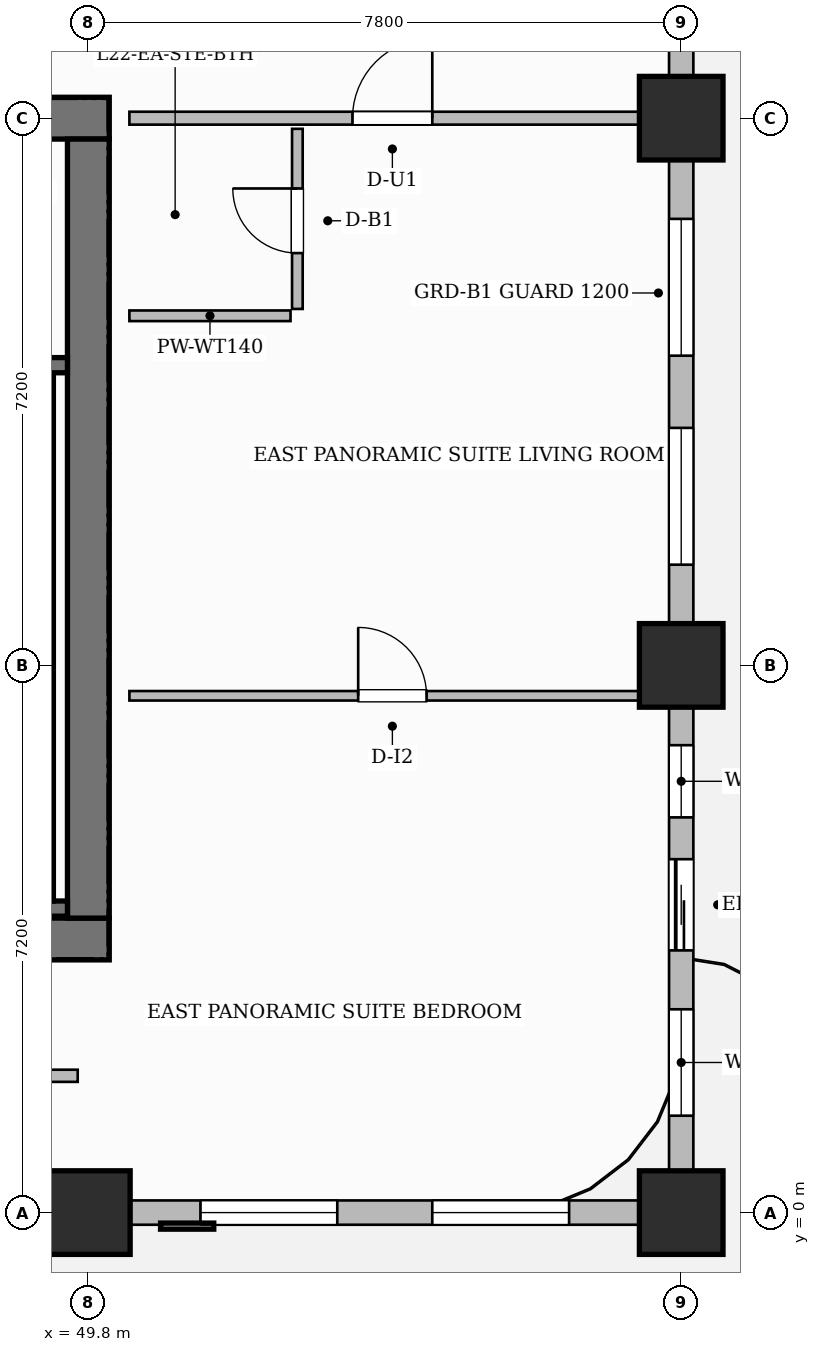
"""IFC4 building model, lengths in metres.
Left out: names, types, materials, properties, quantities, classifications, styles, units other than length and angle.
Written with IfcOpenShell. Run it as: python <this file> out.ifc"""

import sys

from ifc_helpers import new_model, si_unit, direction, frame, frame_2d, origin, origin_2d, place, context, subcontext, project, spatial, rectangle, extrude, source, transform, mapped, element, fill, save


model = new_model("IFC4")
c1 = context("Model", 3, precision=1e-05, world=origin(), true_north=direction((0.0, 1.0)))
c2 = subcontext(c1, "Body", "Model", "MODEL_VIEW")
j1 = project(units=[si_unit("LENGTHUNIT", "METRE"), si_unit("PLANEANGLEUNIT", "RADIAN")], contexts=[c1])
p1 = place(None, origin())
s1 = spatial("IfcSite", under=j1, at=p1, CompositionType="ELEMENT")
p2 = place(p1, origin())
s2 = spatial("IfcBuilding", under=s1, at=p2, CompositionType="ELEMENT")
p3 = place(p2, frame((0.0, 0.0, 91.6)))
s3 = spatial("IfcBuildingStorey", under=s2, at=p3, CompositionType="ELEMENT", Elevation=91.6)
p4 = place(p3, frame((34.525, 3.6, 0.0), z_axis=(0.0, 0.0, 1.0), x_axis=(1.0, 0.0, 0.0)))
e1 = element("IfcWall", 1, at=p4, inside=s3, PredefinedType="SHEAR", context=c2, shape_type="SweptSolid", body=[
    extrude(rectangle(XDim=15.55, YDim=0.55, at=frame_2d((7.775, 0.0))), origin(), (0.0, 0.0, 1.0), 3.7),
])
p5 = place(p4, frame((4.475, 0.0, 0.0)))
e2 = element("IfcOpeningElement", 2, at=p5, cuts=e1, PredefinedType="OPENING", context=c2, shape_type="SweptSolid", body=[
    extrude(rectangle(XDim=0.9, YDim=2.1, at=frame_2d((0.45, 1.05))), frame((0.0, 0.285, 0.0), z_axis=(0.0, -1.0, 0.0), x_axis=(1.0, 0.0, 0.0)), (0.0, 0.0, 1.0), 0.57),
])
p6 = place(p4, frame((6.925, 0.0, 0.0)))
e3 = element("IfcOpeningElement", 3, at=p6, cuts=e1, PredefinedType="OPENING", context=c2, shape_type="SweptSolid", body=[
    extrude(rectangle(XDim=0.9, YDim=2.1, at=frame_2d((0.45, 1.05))), frame((0.0, 0.285, 0.0), z_axis=(0.0, -1.0, 0.0), x_axis=(1.0, 0.0, 0.0)), (0.0, 0.0, 1.0), 0.57),
])
p7 = place(p3, frame((34.525, 14.4, 0.0), z_axis=(0.0, 0.0, 1.0), x_axis=(1.0, 0.0, 0.0)))
e4 = element("IfcWall", 4, at=p7, inside=s3, PredefinedType="SHEAR", context=c2, shape_type="SweptSolid", body=[
    extrude(rectangle(XDim=15.55, YDim=0.55, at=frame_2d((7.775, 0.0))), origin(), (0.0, 0.0, 1.0), 3.7),
])
p8 = place(p7, frame((5.405, 0.0, 0.0)))
e5 = element("IfcOpeningElement", 5, at=p8, cuts=e4, PredefinedType="OPENING", context=c2, shape_type="SweptSolid", body=[
    extrude(rectangle(XDim=1.5, YDim=2.2, at=frame_2d((0.75, 1.1))), frame((0.0, 0.285, 0.0), z_axis=(0.0, -1.0, 0.0), x_axis=(1.0, 0.0, 0.0)), (0.0, 0.0, 1.0), 0.57),
])
p9 = place(p7, frame((1.62, 0.0, 0.0)))
e6 = element("IfcOpeningElement", 6, at=p9, cuts=e4, PredefinedType="OPENING", context=c2, shape_type="SweptSolid", body=[
    extrude(rectangle(XDim=1.05, YDim=2.15, at=frame_2d((0.525, 1.075))), frame((0.0, 0.285, 0.0), z_axis=(0.0, -1.0, 0.0), x_axis=(1.0, 0.0, 0.0)), (0.0, 0.0, 1.0), 0.57),
])
p10 = place(p7, frame((11.25, 0.0, 0.0)))
e7 = element("IfcOpeningElement", 7, at=p10, cuts=e4, PredefinedType="OPENING", context=c2, shape_type="SweptSolid", body=[
    extrude(rectangle(XDim=1.05, YDim=2.15, at=frame_2d((0.525, 1.075))), frame((0.0, 0.285, 0.0), z_axis=(0.0, -1.0, 0.0), x_axis=(1.0, 0.0, 0.0)), (0.0, 0.0, 1.0), 0.57),
])
p11 = place(p3, frame((49.8, 3.875, 0.0), z_axis=(0.0, 0.0, 1.0), x_axis=(0.0, 1.0, 0.0)))
e8 = element("IfcWall", 8, at=p11, inside=s3, PredefinedType="SHEAR", context=c2, shape_type="SweptSolid", body=[
    extrude(rectangle(XDim=10.25, YDim=0.55, at=frame_2d((5.125, 0.0))), origin(), (0.0, 0.0, 1.0), 3.7),
])
m1 = source(origin(), c2, "Body", "SweptSolid", [
    extrude(rectangle(XDim=1.1, YDim=1.1, at=origin_2d()), origin(), (0.0, 0.0, 1.0), 3.7),
])
for number, where, z_axis, x_axis in (
    (9, (49.8, 0.0, 0.0), (0.0, 0.0, 1.0), (1.0, 0.0, 0.0)),
    (10, (57.6, 0.0, 0.0), (0.0, 0.0, 1.0), (1.0, 0.0, 0.0)),
    (11, (57.6, 7.2, 0.0), (0.0, 0.0, 1.0), (1.0, 0.0, 0.0)),
    (12, (57.6, 14.4, 0.0), (0.0, 0.0, 1.0), (1.0, 0.0, 0.0)),
):
    element("IfcColumn", number, at=place(p3, frame(where, z_axis=z_axis, x_axis=x_axis)), inside=s3, PredefinedType="COLUMN", context=c2, shape_type="MappedRepresentation", body=[
        mapped(m1, transform((0.0, 0.0, 0.0), scale=1.0)),
    ])
p12 = place(p3, frame((43.12, 4.0, 0.0), z_axis=(0.0, 0.0, 1.0), x_axis=(1.0, 0.0, 0.0)))
e13 = element("IfcWall", 13, at=p12, inside=s3, PredefinedType="SHEAR", context=c2, shape_type="SweptSolid", body=[
    extrude(rectangle(XDim=6.405, YDim=0.2, at=frame_2d((3.202, 0.0))), origin(), (0.0, 0.0, 1.0), 3.7),
])
p13 = place(p3, frame((49.24, 4.1, 0.0), z_axis=(0.0, 0.0, 1.0), x_axis=(0.0, 1.0, 0.0)))
e14 = element("IfcWall", 14, at=p13, inside=s3, PredefinedType="SHEAR", context=c2, shape_type="SweptSolid", body=[
    extrude(rectangle(XDim=6.95, YDim=0.2, at=frame_2d((3.475, 0.0))), origin(), (0.0, 0.0, 1.0), 3.7),
])
p14 = place(p3, frame((43.12, 11.15, 0.0), z_axis=(0.0, 0.0, 1.0), x_axis=(1.0, 0.0, 0.0)))
e15 = element("IfcWall", 15, at=p14, inside=s3, PredefinedType="SHEAR", context=c2, shape_type="SweptSolid", body=[
    extrude(rectangle(XDim=6.405, YDim=0.2, at=frame_2d((3.202, 0.0))), origin(), (0.0, 0.0, 1.0), 3.7),
])
p15 = place(p14, frame((1.045, 0.0, 0.0)))
e16 = element("IfcOpeningElement", 16, at=p15, cuts=e15, PredefinedType="OPENING", context=c2, shape_type="SweptSolid", body=[
    extrude(rectangle(XDim=1.05, YDim=2.2, at=frame_2d((0.525, 1.1))), frame((0.0, 0.11, 0.0), z_axis=(0.0, -1.0, 0.0), x_axis=(1.0, 0.0, 0.0)), (0.0, 0.0, 1.0), 0.22),
])
p16 = place(p14, frame((4.125, 0.0, 0.0)))
e17 = element("IfcOpeningElement", 17, at=p16, cuts=e15, PredefinedType="OPENING", context=c2, shape_type="SweptSolid", body=[
    extrude(rectangle(XDim=1.05, YDim=2.2, at=frame_2d((0.525, 1.1))), frame((0.0, 0.11, 0.0), z_axis=(0.0, -1.0, 0.0), x_axis=(1.0, 0.0, 0.0)), (0.0, 0.0, 1.0), 0.22),
])
p17 = place(p3, frame((30.29, 1.8, 0.0), z_axis=(0.0, 0.0, 1.0), x_axis=(1.0, 0.0, 0.0)))
e18 = element("IfcWall", 18, at=p17, inside=s3, PredefinedType="PARTITIONING", context=c2, shape_type="SweptSolid", body=[
    extrude(rectangle(XDim=19.37, YDim=0.16, at=frame_2d((9.685, 0.0))), origin(), (0.0, 0.0, 1.0), 3.45),
])
p18 = place(p17, frame((9.735, 0.0, 0.0)))
e19 = element("IfcOpeningElement", 19, at=p18, cuts=e18, PredefinedType="OPENING", context=c2, shape_type="SweptSolid", body=[
    extrude(rectangle(XDim=0.95, YDim=2.15, at=frame_2d((0.475, 1.075))), frame((0.0, 0.09, 0.0), z_axis=(0.0, -1.0, 0.0), x_axis=(1.0, 0.0, 0.0)), (0.0, 0.0, 1.0), 0.18),
])
p19 = place(p3, frame((50.34, 14.4, 0.0), z_axis=(0.0, 0.0, 1.0), x_axis=(1.0, 0.0, 0.0)))
e20 = element("IfcWall", 20, at=p19, inside=s3, PredefinedType="PARTITIONING", context=c2, shape_type="SweptSolid", body=[
    extrude(rectangle(XDim=7.07, YDim=0.17, at=frame_2d((3.535, 0.0))), origin(), (0.0, 0.0, 1.0), 2.885),
])
p20 = place(p19, frame((2.935, 0.0, 0.0)))
e21 = element("IfcOpeningElement", 21, at=p20, cuts=e20, PredefinedType="OPENING", context=c2, shape_type="SweptSolid", body=[
    extrude(rectangle(XDim=1.05, YDim=2.25, at=frame_2d((0.525, 1.125))), frame((0.0, 0.095, 0.0), z_axis=(0.0, -1.0, 0.0), x_axis=(1.0, 0.0, 0.0)), (0.0, 0.0, 1.0), 0.19),
])
p21 = place(p3, frame((52.55, 11.89, 0.0), z_axis=(0.0, 0.0, 1.0), x_axis=(0.0, 1.0, 0.0)))
e22 = element("IfcWall", 22, at=p21, inside=s3, PredefinedType="PARTITIONING", context=c2, shape_type="SweptSolid", body=[
    extrude(rectangle(XDim=2.37, YDim=0.14, at=frame_2d((1.185, 0.0))), origin(), (0.0, 0.0, 1.0), 3.45),
])
p22 = place(p21, frame((0.735, 0.0, 0.0)))
e23 = element("IfcOpeningElement", 23, at=p22, cuts=e22, PredefinedType="OPENING", context=c2, shape_type="SweptSolid", body=[
    extrude(rectangle(XDim=0.85, YDim=2.1, at=frame_2d((0.425, 1.05))), frame((0.0, 0.08, 0.0), z_axis=(0.0, -1.0, 0.0), x_axis=(1.0, 0.0, 0.0)), (0.0, 0.0, 1.0), 0.16),
])
p23 = place(p3, frame((50.34, 11.8, 0.0), z_axis=(0.0, 0.0, 1.0), x_axis=(1.0, 0.0, 0.0)))
e24 = element("IfcWall", 24, at=p23, inside=s3, PredefinedType="PARTITIONING", context=c2, shape_type="SweptSolid", body=[
    extrude(rectangle(XDim=2.12, YDim=0.14, at=frame_2d((1.06, 0.0))), origin(), (0.0, 0.0, 1.0), 3.45),
])
p24 = place(p3, frame((50.34, 6.8, 0.0), z_axis=(0.0, 0.0, 1.0), x_axis=(1.0, 0.0, 0.0)))
e25 = element("IfcWall", 25, at=p24, inside=s3, PredefinedType="PARTITIONING", context=c2, shape_type="SweptSolid", body=[
    extrude(rectangle(XDim=7.07, YDim=0.125, at=frame_2d((3.535, 0.0))), origin(), (0.0, 0.0, 1.0), 3.45),
])
p25 = place(p24, frame((3.01, 0.0, 0.0)))
e26 = element("IfcOpeningElement", 26, at=p25, cuts=e25, PredefinedType="OPENING", context=c2, shape_type="SweptSolid", body=[
    extrude(rectangle(XDim=0.9, YDim=2.15, at=frame_2d((0.45, 1.075))), frame((0.0, 0.073, 0.0), z_axis=(0.0, -1.0, 0.0), x_axis=(1.0, 0.0, 0.0)), (0.0, 0.0, 1.0), 0.145),
])
p26 = place(p3, frame((14.4, 0.0, 0.0), z_axis=(0.0, 0.0, 1.0), x_axis=(1.0, 0.0, 0.0)))
e27 = element("IfcWall", 27, at=p26, inside=s3, PredefinedType="SOLIDWALL", context=c2, shape_type="SweptSolid", body=[
    extrude(rectangle(XDim=43.2, YDim=0.32, at=frame_2d((21.6, 0.0))), origin(), (0.0, 0.0, 1.0), 2.885),
])
p27 = place(p26, frame((0.85, 0.0, 0.0)))
e28 = element("IfcOpeningElement", 28, at=p27, cuts=e27, PredefinedType="OPENING", context=c2, shape_type="SweptSolid", body=[
    extrude(rectangle(XDim=1.2, YDim=2.2, at=frame_2d((0.6, 1.1))), frame((0.0, 0.17, 0.0), z_axis=(0.0, -1.0, 0.0), x_axis=(1.0, 0.0, 0.0)), (0.0, 0.0, 1.0), 0.34),
])
p28 = place(p26, frame((3.475, 0.0, 0.8)))
e29 = element("IfcOpeningElement", 29, at=p28, cuts=e27, PredefinedType="OPENING", context=c2, shape_type="SweptSolid", body=[
    extrude(rectangle(XDim=1.8, YDim=1.85, at=frame_2d((0.9, 0.925))), frame((0.0, 0.17, 0.0), z_axis=(0.0, -1.0, 0.0), x_axis=(1.0, 0.0, 0.0)), (0.0, 0.0, 1.0), 0.34),
])
p29 = place(p26, frame((8.181, 0.0, 0.8)))
e30 = element("IfcOpeningElement", 30, at=p29, cuts=e27, PredefinedType="OPENING", context=c2, shape_type="SweptSolid", body=[
    extrude(rectangle(XDim=0.95, YDim=1.75, at=frame_2d((0.475, 0.875))), frame((0.0, 0.17, 0.0), z_axis=(0.0, -1.0, 0.0), x_axis=(1.0, 0.0, 0.0)), (0.0, 0.0, 1.0), 0.34),
])
p30 = place(p26, frame((10.564, 0.0, 0.8)))
e31 = element("IfcOpeningElement", 31, at=p30, cuts=e27, PredefinedType="OPENING", context=c2, shape_type="SweptSolid", body=[
    extrude(rectangle(XDim=1.8, YDim=1.85, at=frame_2d((0.9, 0.925))), frame((0.0, 0.17, 0.0), z_axis=(0.0, -1.0, 0.0), x_axis=(1.0, 0.0, 0.0)), (0.0, 0.0, 1.0), 0.34),
])
p31 = place(p26, frame((16.804, 0.0, 0.8)))
e32 = element("IfcOpeningElement", 32, at=p31, cuts=e27, PredefinedType="OPENING", context=c2, shape_type="SweptSolid", body=[
    extrude(rectangle(XDim=1.8, YDim=1.85, at=frame_2d((0.9, 0.925))), frame((0.0, 0.17, 0.0), z_axis=(0.0, -1.0, 0.0), x_axis=(1.0, 0.0, 0.0)), (0.0, 0.0, 1.0), 0.34),
])
p32 = place(p26, frame((21.725, 0.0, 0.8)))
e33 = element("IfcOpeningElement", 33, at=p32, cuts=e27, PredefinedType="OPENING", context=c2, shape_type="SweptSolid", body=[
    extrude(rectangle(XDim=1.8, YDim=1.85, at=frame_2d((0.9, 0.925))), frame((0.0, 0.17, 0.0), z_axis=(0.0, -1.0, 0.0), x_axis=(1.0, 0.0, 0.0)), (0.0, 0.0, 1.0), 0.34),
])
p33 = place(p26, frame((24.475, 0.0, 0.8)))
e34 = element("IfcOpeningElement", 34, at=p33, cuts=e27, PredefinedType="OPENING", context=c2, shape_type="SweptSolid", body=[
    extrude(rectangle(XDim=1.8, YDim=1.85, at=frame_2d((0.9, 0.925))), frame((0.0, 0.17, 0.0), z_axis=(0.0, -1.0, 0.0), x_axis=(1.0, 0.0, 0.0)), (0.0, 0.0, 1.0), 0.34),
])
p34 = place(p26, frame((29.075, 0.0, 0.8)))
e35 = element("IfcOpeningElement", 35, at=p34, cuts=e27, PredefinedType="OPENING", context=c2, shape_type="SweptSolid", body=[
    extrude(rectangle(XDim=1.8, YDim=1.85, at=frame_2d((0.9, 0.925))), frame((0.0, 0.17, 0.0), z_axis=(0.0, -1.0, 0.0), x_axis=(1.0, 0.0, 0.0)), (0.0, 0.0, 1.0), 0.34),
])
p35 = place(p26, frame((32.125, 0.0, 0.8)))
e36 = element("IfcOpeningElement", 36, at=p35, cuts=e27, PredefinedType="OPENING", context=c2, shape_type="SweptSolid", body=[
    extrude(rectangle(XDim=1.8, YDim=1.85, at=frame_2d((0.9, 0.925))), frame((0.0, 0.17, 0.0), z_axis=(0.0, -1.0, 0.0), x_axis=(1.0, 0.0, 0.0)), (0.0, 0.0, 1.0), 0.34),
])
p36 = place(p26, frame((36.875, 0.0, 0.8)))
e37 = element("IfcOpeningElement", 37, at=p36, cuts=e27, PredefinedType="OPENING", context=c2, shape_type="SweptSolid", body=[
    extrude(rectangle(XDim=1.8, YDim=1.85, at=frame_2d((0.9, 0.925))), frame((0.0, 0.17, 0.0), z_axis=(0.0, -1.0, 0.0), x_axis=(1.0, 0.0, 0.0)), (0.0, 0.0, 1.0), 0.34),
])
p37 = place(p26, frame((39.925, 0.0, 0.8)))
e38 = element("IfcOpeningElement", 38, at=p37, cuts=e27, PredefinedType="OPENING", context=c2, shape_type="SweptSolid", body=[
    extrude(rectangle(XDim=1.8, YDim=1.85, at=frame_2d((0.9, 0.925))), frame((0.0, 0.17, 0.0), z_axis=(0.0, -1.0, 0.0), x_axis=(1.0, 0.0, 0.0)), (0.0, 0.0, 1.0), 0.34),
])
p38 = place(p3, frame((57.6, 0.05, 0.0), z_axis=(0.0, 0.0, 1.0), x_axis=(0.0, 1.0, 0.0)))
e39 = element("IfcWall", 39, at=p38, inside=s3, PredefinedType="SOLIDWALL", context=c2, shape_type="SweptSolid", body=[
    extrude(rectangle(XDim=21.5, YDim=0.32, at=frame_2d((10.75, 0.0))), origin(), (0.0, 0.0, 1.0), 2.885),
])
p39 = place(p38, frame((3.4, 0.0, 0.0)))
e40 = element("IfcOpeningElement", 40, at=p39, cuts=e39, PredefinedType="OPENING", context=c2, shape_type="SweptSolid", body=[
    extrude(rectangle(XDim=1.2, YDim=2.2, at=frame_2d((0.6, 1.1))), frame((0.0, 0.17, 0.0), z_axis=(0.0, -1.0, 0.0), x_axis=(1.0, 0.0, 0.0)), (0.0, 0.0, 1.0), 0.34),
])
p40 = place(p38, frame((1.225, 0.0, 0.8)))
e41 = element("IfcOpeningElement", 41, at=p40, cuts=e39, PredefinedType="OPENING", context=c2, shape_type="SweptSolid", body=[
    extrude(rectangle(XDim=1.4, YDim=1.85, at=frame_2d((0.7, 0.925))), frame((0.0, 0.17, 0.0), z_axis=(0.0, -1.0, 0.0), x_axis=(1.0, 0.0, 0.0)), (0.0, 0.0, 1.0), 0.34),
])
p41 = place(p38, frame((5.15, 0.0, 0.8)))
e42 = element("IfcOpeningElement", 42, at=p41, cuts=e39, PredefinedType="OPENING", context=c2, shape_type="SweptSolid", body=[
    extrude(rectangle(XDim=0.95, YDim=1.75, at=frame_2d((0.475, 0.875))), frame((0.0, 0.17, 0.0), z_axis=(0.0, -1.0, 0.0), x_axis=(1.0, 0.0, 0.0)), (0.0, 0.0, 1.0), 0.34),
])
p42 = place(p38, frame((8.475, 0.0, 0.8)))
e43 = element("IfcOpeningElement", 43, at=p42, cuts=e39, PredefinedType="OPENING", context=c2, shape_type="SweptSolid", body=[
    extrude(rectangle(XDim=1.8, YDim=1.85, at=frame_2d((0.9, 0.925))), frame((0.0, 0.17, 0.0), z_axis=(0.0, -1.0, 0.0), x_axis=(1.0, 0.0, 0.0)), (0.0, 0.0, 1.0), 0.34),
])
p43 = place(p38, frame((11.225, 0.0, 0.8)))
e44 = element("IfcOpeningElement", 44, at=p43, cuts=e39, PredefinedType="OPENING", context=c2, shape_type="SweptSolid", body=[
    extrude(rectangle(XDim=1.8, YDim=1.85, at=frame_2d((0.9, 0.925))), frame((0.0, 0.17, 0.0), z_axis=(0.0, -1.0, 0.0), x_axis=(1.0, 0.0, 0.0)), (0.0, 0.0, 1.0), 0.34),
])
p44 = place(p38, frame((17.679, 0.0, 0.8)))
e45 = element("IfcOpeningElement", 45, at=p44, cuts=e39, PredefinedType="OPENING", context=c2, shape_type="SweptSolid", body=[
    extrude(rectangle(XDim=1.8, YDim=1.85, at=frame_2d((0.9, 0.925))), frame((0.0, 0.17, 0.0), z_axis=(0.0, -1.0, 0.0), x_axis=(1.0, 0.0, 0.0)), (0.0, 0.0, 1.0), 0.34),
])
m2 = source(origin(), c2, "Body", "SweptSolid", [
    extrude(rectangle(XDim=1.05, YDim=2.25, at=frame_2d((0.525, 1.125))), frame((0.0, 0.025, 0.0), z_axis=(0.0, -1.0, 0.0), x_axis=(1.0, 0.0, 0.0)), (0.0, 0.0, 1.0), 0.05),
])
p45 = place(p20, origin())
e46 = element("IfcDoor", 46, at=p45, inside=s3, OperationType="SINGLE_SWING_RIGHT", PredefinedType="DOOR", context=c2, shape_type="MappedRepresentation", body=[
    mapped(m2, transform((0.0, 0.0, 0.0), scale=1.0)),
])
fill(e21, e46)
m3 = source(origin(), c2, "Body", "SweptSolid", [
    extrude(rectangle(XDim=0.85, YDim=2.1, at=frame_2d((0.425, 1.05))), frame((0.0, 0.025, 0.0), z_axis=(0.0, -1.0, 0.0), x_axis=(1.0, 0.0, 0.0)), (0.0, 0.0, 1.0), 0.05),
])
p46 = place(p22, origin())
e47 = element("IfcDoor", 47, at=p46, inside=s3, OperationType="SINGLE_SWING_RIGHT", PredefinedType="DOOR", context=c2, shape_type="MappedRepresentation", body=[
    mapped(m3, transform((0.0, 0.0, 0.0), scale=1.0)),
])
fill(e23, e47)
m4 = source(origin(), c2, "Body", "SweptSolid", [
    extrude(rectangle(XDim=0.9, YDim=2.15, at=frame_2d((0.45, 1.075))), frame((0.0, 0.025, 0.0), z_axis=(0.0, -1.0, 0.0), x_axis=(1.0, 0.0, 0.0)), (0.0, 0.0, 1.0), 0.05),
])
p47 = place(p25, origin())
e48 = element("IfcDoor", 48, at=p47, inside=s3, OperationType="SINGLE_SWING_LEFT", PredefinedType="DOOR", context=c2, shape_type="MappedRepresentation", body=[
    mapped(m4, transform((0.0, 0.0, 0.0), scale=1.0)),
])
fill(e26, e48)
m5 = source(origin(), c2, "Body", "SweptSolid", [
    extrude(rectangle(XDim=1.2, YDim=2.2, at=frame_2d((0.6, 1.1))), frame((0.0, 0.025, 0.0), z_axis=(0.0, -1.0, 0.0), x_axis=(1.0, 0.0, 0.0)), (0.0, 0.0, 1.0), 0.05),
])
p48 = place(p39, origin())
e49 = element("IfcDoor", 49, at=p48, inside=s3, OperationType="SLIDING_TO_LEFT", PredefinedType="DOOR", context=c2, shape_type="MappedRepresentation", body=[
    mapped(m5, transform((0.0, 0.0, 0.0), scale=1.0)),
])
fill(e40, e49)
m6 = source(origin(), c2, "Body", "SweptSolid", [
    extrude(rectangle(XDim=1.8, YDim=1.85, at=frame_2d((0.9, 0.925))), frame((0.0, 0.03, 0.0), z_axis=(0.0, -1.0, 0.0), x_axis=(1.0, 0.0, 0.0)), (0.0, 0.0, 1.0), 0.06),
])
p49 = place(p36, origin())
e50 = element("IfcWindow", 50, at=p49, inside=s3, PartitioningType="DOUBLE_PANEL_VERTICAL", PredefinedType="WINDOW", context=c2, shape_type="MappedRepresentation", body=[
    mapped(m6, transform((0.0, 0.0, 0.0), scale=1.0)),
])
fill(e37, e50)
p50 = place(p37, origin())
e51 = element("IfcWindow", 51, at=p50, inside=s3, PartitioningType="DOUBLE_PANEL_VERTICAL", PredefinedType="WINDOW", context=c2, shape_type="MappedRepresentation", body=[
    mapped(m6, transform((0.0, 0.0, 0.0), scale=1.0)),
])
fill(e38, e51)
m7 = source(origin(), c2, "Body", "SweptSolid", [
    extrude(rectangle(XDim=1.4, YDim=1.85, at=frame_2d((0.7, 0.925))), frame((0.0, 0.03, 0.0), z_axis=(0.0, -1.0, 0.0), x_axis=(1.0, 0.0, 0.0)), (0.0, 0.0, 1.0), 0.06),
])
p51 = place(p40, origin())
e52 = element("IfcWindow", 52, at=p51, inside=s3, PartitioningType="SINGLE_PANEL", PredefinedType="WINDOW", context=c2, shape_type="MappedRepresentation", body=[
    mapped(m7, transform((0.0, 0.0, 0.0), scale=1.0)),
])
fill(e41, e52)
m8 = source(origin(), c2, "Body", "SweptSolid", [
    extrude(rectangle(XDim=0.95, YDim=1.75, at=frame_2d((0.475, 0.875))), frame((0.0, 0.03, 0.0), z_axis=(0.0, -1.0, 0.0), x_axis=(1.0, 0.0, 0.0)), (0.0, 0.0, 1.0), 0.06),
])
p52 = place(p41, origin())
e53 = element("IfcWindow", 53, at=p52, inside=s3, PartitioningType="SINGLE_PANEL", PredefinedType="WINDOW", context=c2, shape_type="MappedRepresentation", body=[
    mapped(m8, transform((0.0, 0.0, 0.0), scale=1.0)),
])
fill(e42, e53)
p53 = place(p42, origin())
e54 = element("IfcWindow", 54, at=p53, inside=s3, PartitioningType="DOUBLE_PANEL_VERTICAL", PredefinedType="WINDOW", context=c2, shape_type="MappedRepresentation", body=[
    mapped(m6, transform((0.0, 0.0, 0.0), scale=1.0)),
])
fill(e43, e54)
p54 = place(p43, origin())
e55 = element("IfcWindow", 55, at=p54, inside=s3, PartitioningType="DOUBLE_PANEL_VERTICAL", PredefinedType="WINDOW", context=c2, shape_type="MappedRepresentation", body=[
    mapped(m6, transform((0.0, 0.0, 0.0), scale=1.0)),
])
fill(e44, e55)
save(model, sys.argv[1])
